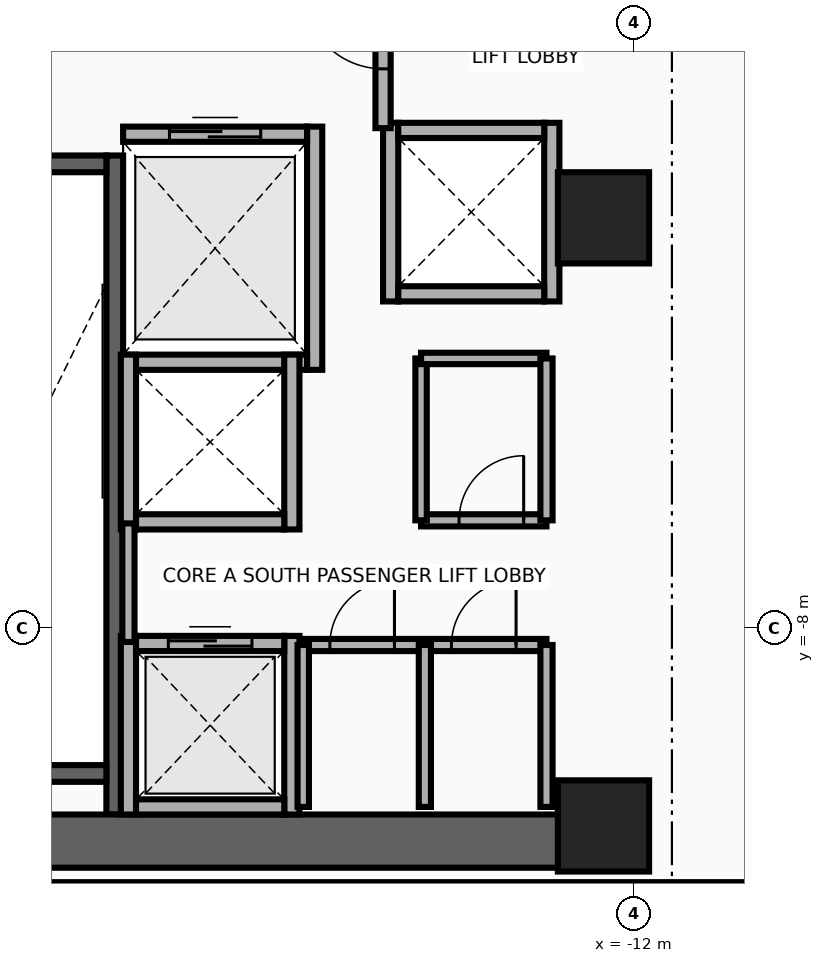
"""IFC4 building model, lengths in metres.
Left out: names, types, materials, properties, quantities, classifications, styles, units other than length and angle.
Written with IfcOpenShell. Run it as: python <this file> out.ifc"""

import sys

from ifc_helpers import new_model, si_unit, direction, frame, frame_2d, origin, origin_2d, place, context, subcontext, project, spatial, rectangle, extrude, source, transform, mapped, element, fill, save


model = new_model("IFC4")
c1 = context("Model", 3, precision=1e-05, world=origin(), true_north=direction((0.0, 1.0)))
c2 = subcontext(c1, "Body", "Model", "MODEL_VIEW")
j1 = project(units=[si_unit("LENGTHUNIT", "METRE"), si_unit("PLANEANGLEUNIT", "RADIAN")], contexts=[c1])
p1 = place(None, origin())
s1 = spatial("IfcSite", under=j1, at=p1, CompositionType="ELEMENT")
p2 = place(p1, origin())
s2 = spatial("IfcBuilding", under=s1, at=p2, CompositionType="ELEMENT")
p3 = place(p2, frame((0.0, 0.0, 109.4)))
s3 = spatial("IfcBuildingStorey", under=s2, at=p3, CompositionType="ELEMENT", Elevation=109.4)
p4 = place(p3, frame((-18.83, -10.45, 0.0), z_axis=(0.0, 0.0, 1.0), x_axis=(0.0, 1.0, 0.0)))
e1 = element("IfcWall", 1, at=p4, inside=s3, PredefinedType="SHEAR", context=c2, shape_type="SweptSolid", body=[
    extrude(rectangle(XDim=8.67, YDim=0.22, at=frame_2d((4.335, 0.0))), origin(), (0.0, 0.0, 1.0), 3.46),
])
p5 = place(p3, frame((-22.05, -9.91, 0.0), z_axis=(0.0, 0.0, 1.0), x_axis=(1.0, 0.0, 0.0)))
e2 = element("IfcWall", 2, at=p5, inside=s3, PredefinedType="SHEAR", context=c2, shape_type="SweptSolid", body=[
    extrude(rectangle(XDim=3.11, YDim=0.22, at=frame_2d((1.555, 0.0))), origin(), (0.0, 0.0, 1.0), 3.46),
])
p6 = place(p3, frame((-22.05, -1.89, 0.0), z_axis=(0.0, 0.0, 1.0), x_axis=(1.0, 0.0, 0.0)))
e3 = element("IfcWall", 3, at=p6, inside=s3, PredefinedType="SHEAR", context=c2, shape_type="SweptSolid", body=[
    extrude(rectangle(XDim=3.11, YDim=0.22, at=frame_2d((1.555, 0.0))), origin(), (0.0, 0.0, 1.0), 3.46),
])
p7 = place(p6, frame((1.0, 0.0, 0.0)))
e4 = element("IfcOpeningElement", 4, at=p7, cuts=e3, PredefinedType="OPENING", context=c2, shape_type="SweptSolid", body=[
    extrude(rectangle(XDim=1.1, YDim=2.15, at=frame_2d((0.55, 1.075))), frame((0.0, 0.125, 0.0), z_axis=(0.0, -1.0, 0.0), x_axis=(1.0, 0.0, 0.0)), (0.0, 0.0, 1.0), 0.25),
])
p8 = place(p3, frame((-22.65, -10.8, 0.0), z_axis=(0.0, 0.0, 1.0), x_axis=(1.0, 0.0, 0.0)))
e5 = element("IfcWall", 5, at=p8, inside=s3, PredefinedType="SHEAR", context=c2, shape_type="SweptSolid", body=[
    extrude(rectangle(XDim=10.25, YDim=0.7, at=frame_2d((5.125, 0.0))), origin(), (0.0, 0.0, 1.0), 3.46),
])
m1 = source(origin(), c2, "Body", "SweptSolid", [
    extrude(rectangle(XDim=1.2, YDim=1.2, at=origin_2d()), origin(), (0.0, 0.0, 1.0), 3.7),
])
for number, where, z_axis, x_axis in (
    (6, (-12.4, -10.6, 0.0), (0.0, 0.0, 1.0), (1.0, 0.0, 0.0)),
    (7, (-12.4, -2.6, 0.0), (0.0, 0.0, 1.0), (1.0, 0.0, 0.0)),
):
    element("IfcColumn", number, at=place(p3, frame(where, z_axis=z_axis, x_axis=x_axis)), inside=s3, PredefinedType="COLUMN", context=c2, shape_type="MappedRepresentation", body=[
        mapped(m1, transform((0.0, 0.0, 0.0), x_axis=(1.0, 0.0, 0.0), y_axis=(0.0, 1.0, 0.0), z_axis=(0.0, 0.0, 1.0), scale=1.0)),
    ])
p9 = place(p3, frame((-16.2, -4.6, 0.0), z_axis=(0.0, 0.0, 1.0), x_axis=(0.0, 1.0, 0.0)))
e8 = element("IfcWall", 8, at=p9, inside=s3, PredefinedType="MOVABLE", context=c2, shape_type="SweptSolid", body=[
    extrude(rectangle(XDim=3.2, YDim=0.2, at=frame_2d((1.6, 0.0))), origin(), (0.0, 0.0, 1.0), 3.46),
])
p10 = place(p3, frame((-18.72, -4.5, 0.0), z_axis=(0.0, 0.0, 1.0), x_axis=(1.0, 0.0, 0.0)))
e9 = element("IfcWall", 9, at=p10, inside=s3, PredefinedType="MOVABLE", context=c2, shape_type="SweptSolid", body=[
    extrude(rectangle(XDim=2.42, YDim=0.2, at=frame_2d((1.21, 0.0))), origin(), (0.0, 0.0, 1.0), 3.46),
])
p11 = place(p3, frame((-18.72, -1.5, 0.0), z_axis=(0.0, 0.0, 1.0), x_axis=(1.0, 0.0, 0.0)))
e10 = element("IfcWall", 10, at=p11, inside=s3, PredefinedType="MOVABLE", context=c2, shape_type="SweptSolid", body=[
    extrude(rectangle(XDim=2.42, YDim=0.2, at=frame_2d((1.21, 0.0))), origin(), (0.0, 0.0, 1.0), 3.46),
])
p12 = place(p11, frame((0.61, 0.0, 0.0)))
e11 = element("IfcOpeningElement", 11, at=p12, cuts=e10, PredefinedType="OPENING", context=c2, shape_type="SweptSolid", body=[
    extrude(rectangle(XDim=1.2, YDim=2.1, at=frame_2d((0.6, 1.05))), frame((0.0, 0.115, 0.0), z_axis=(0.0, -1.0, 0.0), x_axis=(1.0, 0.0, 0.0)), (0.0, 0.0, 1.0), 0.23),
])
for number, where, z_axis, x_axis in (
    (12, (-18.65, -10.45, 0.0), (0.0, 0.0, 1.0), (0.0, 1.0, 0.0)),
    (13, (-16.5, -10.45, 0.0), (0.0, 0.0, 1.0), (0.0, 1.0, 0.0)),
):
    element("IfcWall", number, at=place(p3, frame(where, z_axis=z_axis, x_axis=x_axis)), inside=s3, PredefinedType="MOVABLE", context=c2, shape_type="SweptSolid", body=[
        extrude(rectangle(XDim=2.35, YDim=0.2, at=frame_2d((1.175, 0.0))), origin(), (0.0, 0.0, 1.0), 2.666),
    ])
p13 = place(p3, frame((-18.55, -10.35, 0.0), z_axis=(0.0, 0.0, 1.0), x_axis=(1.0, 0.0, 0.0)))
e14 = element("IfcWall", 14, at=p13, inside=s3, PredefinedType="MOVABLE", context=c2, shape_type="SweptSolid", body=[
    extrude(rectangle(XDim=1.95, YDim=0.2, at=frame_2d((0.975, 0.0))), origin(), (0.0, 0.0, 1.0), 2.666),
])
p14 = place(p3, frame((-18.55, -8.2, 0.0), z_axis=(0.0, 0.0, 1.0), x_axis=(1.0, 0.0, 0.0)))
e15 = element("IfcWall", 15, at=p14, inside=s3, PredefinedType="MOVABLE", context=c2, shape_type="SweptSolid", body=[
    extrude(rectangle(XDim=1.95, YDim=0.2, at=frame_2d((0.975, 0.0))), origin(), (0.0, 0.0, 1.0), 3.46),
])
p15 = place(p14, frame((0.425, 0.0, 0.0)))
e16 = element("IfcOpeningElement", 16, at=p15, cuts=e15, PredefinedType="OPENING", context=c2, shape_type="SweptSolid", body=[
    extrude(rectangle(XDim=1.1, YDim=2.1, at=frame_2d((0.55, 1.05))), frame((0.0, 0.115, 0.0), z_axis=(0.0, -1.0, 0.0), x_axis=(1.0, 0.0, 0.0)), (0.0, 0.0, 1.0), 0.23),
])
for number, where, z_axis, x_axis in (
    (17, (-18.65, -6.7, 0.0), (0.0, 0.0, 1.0), (0.0, 1.0, 0.0)),
    (18, (-16.5, -6.7, 0.0), (0.0, 0.0, 1.0), (0.0, 1.0, 0.0)),
):
    element("IfcWall", number, at=place(p3, frame(where, z_axis=z_axis, x_axis=x_axis)), inside=s3, PredefinedType="MOVABLE", context=c2, shape_type="SweptSolid", body=[
        extrude(rectangle(XDim=2.3, YDim=0.2, at=frame_2d((1.15, 0.0))), origin(), (0.0, 0.0, 1.0), 3.46),
    ])
p16 = place(p3, frame((-18.55, -6.6, 0.0), z_axis=(0.0, 0.0, 1.0), x_axis=(1.0, 0.0, 0.0)))
e19 = element("IfcWall", 19, at=p16, inside=s3, PredefinedType="MOVABLE", context=c2, shape_type="SweptSolid", body=[
    extrude(rectangle(XDim=1.95, YDim=0.2, at=frame_2d((0.975, 0.0))), origin(), (0.0, 0.0, 1.0), 3.46),
])
for number, where, z_axis, x_axis in (
    (20, (-15.2, -3.7, 0.0), (0.0, 0.0, 1.0), (0.0, 1.0, 0.0)),
    (21, (-13.08, -3.7, 0.0), (0.0, 0.0, 1.0), (0.0, 1.0, 0.0)),
):
    element("IfcWall", number, at=place(p3, frame(where, z_axis=z_axis, x_axis=x_axis)), inside=s3, PredefinedType="MOVABLE", context=c2, shape_type="SweptSolid", body=[
        extrude(rectangle(XDim=2.35, YDim=0.2, at=frame_2d((1.175, 0.0))), origin(), (0.0, 0.0, 1.0), 3.46),
    ])
for number, where, z_axis, x_axis in (
    (22, (-15.1, -3.6, 0.0), (0.0, 0.0, 1.0), (1.0, 0.0, 0.0)),
    (23, (-15.1, -1.45, 0.0), (0.0, 0.0, 1.0), (1.0, 0.0, 0.0)),
):
    element("IfcWall", number, at=place(p3, frame(where, z_axis=z_axis, x_axis=x_axis)), inside=s3, PredefinedType="MOVABLE", context=c2, shape_type="SweptSolid", body=[
        extrude(rectangle(XDim=1.92, YDim=0.2, at=frame_2d((0.96, 0.0))), origin(), (0.0, 0.0, 1.0), 3.46),
    ])
p17 = place(p3, frame((-15.3, -1.42, 0.0), z_axis=(0.0, 0.0, 1.0), x_axis=(0.0, 1.0, 0.0)))
e24 = element("IfcWall", 24, at=p17, inside=s3, PredefinedType="PARTITIONING", context=c2, shape_type="SweptSolid", body=[
    extrude(rectangle(XDim=2.67, YDim=0.2, at=frame_2d((1.335, 0.0))), origin(), (0.0, 0.0, 1.0), 3.46),
])
p18 = place(p17, frame((0.78, 0.0, 0.0)))
e25 = element("IfcOpeningElement", 25, at=p18, cuts=e24, PredefinedType="OPENING", context=c2, shape_type="SweptSolid", body=[
    extrude(rectangle(XDim=1.05, YDim=2.15, at=frame_2d((0.525, 1.075))), frame((0.0, 0.115, 0.0), z_axis=(0.0, -1.0, 0.0), x_axis=(1.0, 0.0, 0.0)), (0.0, 0.0, 1.0), 0.23),
])
p19 = place(p3, frame((-18.65, -8.18, 0.0), z_axis=(0.0, 0.0, 1.0), x_axis=(0.0, 1.0, 0.0)))
e26 = element("IfcWall", 26, at=p19, inside=s3, PredefinedType="PARTITIONING", context=c2, shape_type="SweptSolid", body=[
    extrude(rectangle(XDim=1.56, YDim=0.16, at=frame_2d((0.78, 0.0))), origin(), (0.0, 0.0, 1.0), 3.46),
])
p20 = place(p3, frame((-16.35, -8.22, 0.0), z_axis=(0.0, 0.0, 1.0), x_axis=(1.0, 0.0, 0.0)))
e27 = element("IfcWall", 27, at=p20, inside=s3, PredefinedType="PARTITIONING", context=c2, shape_type="SweptSolid", body=[
    extrude(rectangle(XDim=3.2, YDim=0.16, at=frame_2d((1.6, 0.0))), origin(), (0.0, 0.0, 1.0), 3.46),
])
p21 = place(p20, frame((0.35, 0.0, 0.0)))
e28 = element("IfcOpeningElement", 28, at=p21, cuts=e27, PredefinedType="OPENING", context=c2, shape_type="SweptSolid", body=[
    extrude(rectangle(XDim=0.85, YDim=2.05, at=frame_2d((0.425, 1.025))), frame((0.0, 0.095, 0.0), z_axis=(0.0, -1.0, 0.0), x_axis=(1.0, 0.0, 0.0)), (0.0, 0.0, 1.0), 0.19),
])
p22 = place(p20, frame((1.95, 0.0, 0.0)))
e29 = element("IfcOpeningElement", 29, at=p22, cuts=e27, PredefinedType="OPENING", context=c2, shape_type="SweptSolid", body=[
    extrude(rectangle(XDim=0.85, YDim=2.05, at=frame_2d((0.425, 1.025))), frame((0.0, 0.095, 0.0), z_axis=(0.0, -1.0, 0.0), x_axis=(1.0, 0.0, 0.0)), (0.0, 0.0, 1.0), 0.19),
])
p23 = place(p3, frame((-16.35, -10.35, 0.0), z_axis=(0.0, 0.0, 1.0), x_axis=(0.0, 1.0, 0.0)))
e30 = element("IfcWall", 30, at=p23, inside=s3, PredefinedType="PARTITIONING", context=c2, shape_type="SweptSolid", body=[
    extrude(rectangle(XDim=2.13, YDim=0.15, at=frame_2d((1.065, 0.0))), origin(), (0.0, 0.0, 1.0), 3.46),
])
for number, where, z_axis, x_axis in (
    (31, (-13.15, -10.35, 0.0), (0.0, 0.0, 1.0), (0.0, 1.0, 0.0)),
    (32, (-14.75, -10.35, 0.0), (0.0, 0.0, 1.0), (0.0, 1.0, 0.0)),
):
    element("IfcWall", number, at=place(p3, frame(where, z_axis=z_axis, x_axis=x_axis)), inside=s3, PredefinedType="PARTITIONING", context=c2, shape_type="SweptSolid", body=[
        extrude(rectangle(XDim=2.13, YDim=0.16, at=frame_2d((1.065, 0.0))), origin(), (0.0, 0.0, 1.0), 3.46),
    ])
p24 = place(p3, frame((-14.8, -6.58, 0.0), z_axis=(0.0, 0.0, 1.0), x_axis=(1.0, 0.0, 0.0)))
e33 = element("IfcWall", 33, at=p24, inside=s3, PredefinedType="PARTITIONING", context=c2, shape_type="SweptSolid", body=[
    extrude(rectangle(XDim=1.65, YDim=0.16, at=frame_2d((0.825, 0.0))), origin(), (0.0, 0.0, 1.0), 3.46),
])
p25 = place(p24, frame((0.5, 0.0, 0.0)))
e34 = element("IfcOpeningElement", 34, at=p25, cuts=e33, PredefinedType="OPENING", context=c2, shape_type="SweptSolid", body=[
    extrude(rectangle(XDim=0.85, YDim=2.05, at=frame_2d((0.425, 1.025))), frame((0.0, 0.095, 0.0), z_axis=(0.0, -1.0, 0.0), x_axis=(1.0, 0.0, 0.0)), (0.0, 0.0, 1.0), 0.19),
])
p26 = place(p3, frame((-14.8, -6.58, 0.0), z_axis=(0.0, 0.0, 1.0), x_axis=(0.0, 1.0, 0.0)))
e35 = element("IfcWall", 35, at=p26, inside=s3, PredefinedType="PARTITIONING", context=c2, shape_type="SweptSolid", body=[
    extrude(rectangle(XDim=2.13, YDim=0.15, at=frame_2d((1.065, 0.0))), origin(), (0.0, 0.0, 1.0), 3.46),
])
p27 = place(p3, frame((-14.8, -4.45, 0.0), z_axis=(0.0, 0.0, 1.0), x_axis=(1.0, 0.0, 0.0)))
e36 = element("IfcWall", 36, at=p27, inside=s3, PredefinedType="PARTITIONING", context=c2, shape_type="SweptSolid", body=[
    extrude(rectangle(XDim=1.65, YDim=0.15, at=frame_2d((0.825, 0.0))), origin(), (0.0, 0.0, 1.0), 3.46),
])
p28 = place(p3, frame((-13.15, -6.58, 0.0), z_axis=(0.0, 0.0, 1.0), x_axis=(0.0, 1.0, 0.0)))
e37 = element("IfcWall", 37, at=p28, inside=s3, PredefinedType="PARTITIONING", context=c2, shape_type="SweptSolid", body=[
    extrude(rectangle(XDim=2.13, YDim=0.16, at=frame_2d((1.065, 0.0))), origin(), (0.0, 0.0, 1.0), 3.46),
])
p29 = place(p3, frame((-23.45, -11.42, 0.0), z_axis=(0.0, 0.0, 1.0), x_axis=(1.0, 0.0, 0.0)))
e38 = element("IfcWall", 38, at=p29, inside=s3, PredefinedType="PARTITIONING", context=c2, shape_type="SweptSolid", body=[
    extrude(rectangle(XDim=13.84, YDim=0.16, at=frame_2d((6.92, 0.0))), origin(), (0.0, 0.0, 1.0), 2.834),
])
p30 = place(p12, origin())
e39 = element("IfcDoor", 39, at=p30, inside=s3, OperationType="DOUBLE_DOOR_SLIDING", PredefinedType="DOOR", context=c2, shape_type="SweptSolid", body=[
    extrude(rectangle(XDim=1.2, YDim=2.1, at=frame_2d((0.6, 1.05))), frame((0.0, 0.025, 0.0), z_axis=(0.0, -1.0, 0.0), x_axis=(1.0, 0.0, 0.0)), (0.0, 0.0, 1.0), 0.05),
])
fill(e11, e39)
p31 = place(p15, origin())
e40 = element("IfcDoor", 40, at=p31, inside=s3, OperationType="DOUBLE_DOOR_SLIDING", PredefinedType="DOOR", context=c2, shape_type="SweptSolid", body=[
    extrude(rectangle(XDim=1.1, YDim=2.1, at=frame_2d((0.55, 1.05))), frame((0.0, 0.025, 0.0), z_axis=(0.0, -1.0, 0.0), x_axis=(1.0, 0.0, 0.0)), (0.0, 0.0, 1.0), 0.05),
])
fill(e16, e40)
p32 = place(p18, origin())
e41 = element("IfcDoor", 41, at=p32, inside=s3, OperationType="SINGLE_SWING_RIGHT", PredefinedType="DOOR", context=c2, shape_type="SweptSolid", body=[
    extrude(rectangle(XDim=1.05, YDim=2.15, at=frame_2d((0.525, 1.075))), frame((0.0, 0.025, 0.0), z_axis=(0.0, -1.0, 0.0), x_axis=(1.0, 0.0, 0.0)), (0.0, 0.0, 1.0), 0.05),
])
fill(e25, e41)
p33 = place(p21, origin())
e42 = element("IfcDoor", 42, at=p33, inside=s3, OperationType="SINGLE_SWING_LEFT", PredefinedType="DOOR", context=c2, shape_type="SweptSolid", body=[
    extrude(rectangle(XDim=0.85, YDim=2.05, at=frame_2d((0.425, 1.025))), frame((0.0, 0.025, 0.0), z_axis=(0.0, -1.0, 0.0), x_axis=(1.0, 0.0, 0.0)), (0.0, 0.0, 1.0), 0.05),
])
fill(e28, e42)
p34 = place(p22, origin())
e43 = element("IfcDoor", 43, at=p34, inside=s3, OperationType="SINGLE_SWING_RIGHT", PredefinedType="DOOR", context=c2, shape_type="SweptSolid", body=[
    extrude(rectangle(XDim=0.85, YDim=2.05, at=frame_2d((0.425, 1.025))), frame((0.0, 0.025, 0.0), z_axis=(0.0, -1.0, 0.0), x_axis=(1.0, 0.0, 0.0)), (0.0, 0.0, 1.0), 0.05),
])
fill(e29, e43)
p35 = place(p25, origin())
e44 = element("IfcDoor", 44, at=p35, inside=s3, OperationType="SINGLE_SWING_LEFT", PredefinedType="DOOR", context=c2, shape_type="SweptSolid", body=[
    extrude(rectangle(XDim=0.85, YDim=2.05, at=frame_2d((0.425, 1.025))), frame((0.0, 0.025, 0.0), z_axis=(0.0, -1.0, 0.0), x_axis=(1.0, 0.0, 0.0)), (0.0, 0.0, 1.0), 0.05),
])
fill(e34, e44)
save(model, sys.argv[1])
